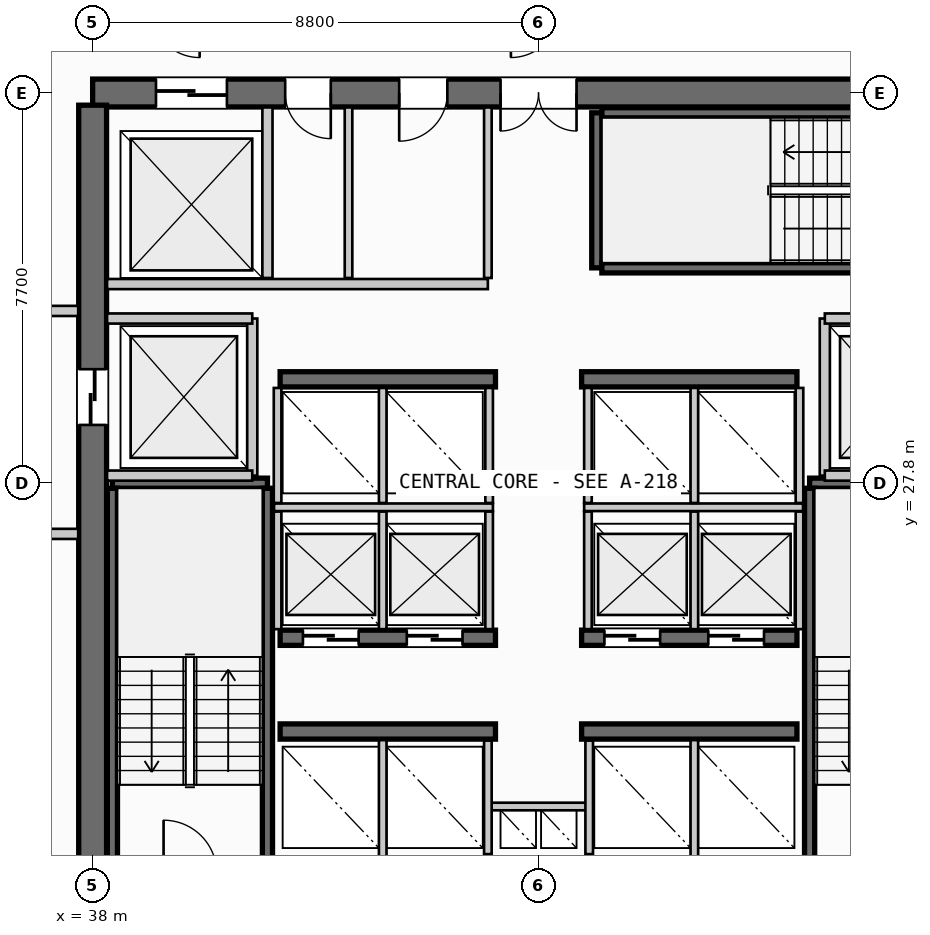
"""IFC4 building model, lengths in metres.
Left out: names, types, materials, properties, quantities, classifications, styles, units other than length and angle.
Written with IfcOpenShell. Run it as: python <this file> out.ifc"""

import sys

from ifc_helpers import new_model, si_unit, direction, frame, frame_2d, origin, place, context, subcontext, project, spatial, rectangle, extrude, source, transform, mapped, element, fill, save


model = new_model("IFC4")
c1 = context("Model", 3, precision=1e-05, world=origin(), true_north=direction((0.0, 1.0)))
c2 = subcontext(c1, "Body", "Model", "MODEL_VIEW")
j1 = project(units=[si_unit("LENGTHUNIT", "METRE"), si_unit("PLANEANGLEUNIT", "RADIAN")], contexts=[c1])
p1 = place(None, origin())
s1 = spatial("IfcSite", under=j1, at=p1, CompositionType="ELEMENT")
p2 = place(p1, origin())
s2 = spatial("IfcBuilding", under=s1, at=p2, CompositionType="ELEMENT")
p3 = place(p2, frame((0.0, 0.0, 128.8)))
s3 = spatial("IfcBuildingStorey", under=s2, at=p3, CompositionType="ELEMENT", Elevation=128.8)
p4 = place(p3, frame((55.6, 35.5, 0.0), z_axis=(0.0, 0.0, 1.0), x_axis=(-1.0, 0.0, 0.0)))
e1 = element("IfcWall", 1, at=p4, inside=s3, PredefinedType="SHEAR", context=c2, shape_type="SweptSolid", body=[
    extrude(rectangle(XDim=17.6, YDim=0.55, at=frame_2d((8.8, 0.0))), origin(), (0.0, 0.0, 1.0), 3.3),
])
p5 = place(p4, frame((8.05, 0.0, 0.0)))
e2 = element("IfcOpeningElement", 2, at=p5, cuts=e1, PredefinedType="OPENING", context=c2, shape_type="SweptSolid", body=[
    extrude(rectangle(XDim=1.5, YDim=2.2, at=frame_2d((0.75, 1.1))), frame((0.0, 0.285, 0.0), z_axis=(0.0, -1.0, 0.0), x_axis=(1.0, 0.0, 0.0)), (0.0, 0.0, 1.0), 0.57),
])
p6 = place(p4, frame((14.95, 0.0, 0.0)))
e3 = element("IfcOpeningElement", 3, at=p6, cuts=e1, PredefinedType="OPENING", context=c2, shape_type="SweptSolid", body=[
    extrude(rectangle(XDim=1.4, YDim=2.3, at=frame_2d((0.7, 1.15))), frame((0.0, 0.285, 0.0), z_axis=(0.0, -1.0, 0.0), x_axis=(1.0, 0.0, 0.0)), (0.0, 0.0, 1.0), 0.57),
])
p7 = place(p4, frame((12.9, 0.0, 0.0)))
e4 = element("IfcOpeningElement", 4, at=p7, cuts=e1, PredefinedType="OPENING", context=c2, shape_type="SweptSolid", body=[
    extrude(rectangle(XDim=0.9, YDim=2.15, at=frame_2d((0.45, 1.075))), frame((0.0, 0.285, 0.0), z_axis=(0.0, -1.0, 0.0), x_axis=(1.0, 0.0, 0.0)), (0.0, 0.0, 1.0), 0.57),
])
p8 = place(p4, frame((10.6, 0.0, 0.0)))
e5 = element("IfcOpeningElement", 5, at=p8, cuts=e1, PredefinedType="OPENING", context=c2, shape_type="SweptSolid", body=[
    extrude(rectangle(XDim=0.95, YDim=2.15, at=frame_2d((0.475, 1.075))), frame((0.0, 0.285, 0.0), z_axis=(0.0, -1.0, 0.0), x_axis=(1.0, 0.0, 0.0)), (0.0, 0.0, 1.0), 0.57),
])
p9 = place(p3, frame((38.0, 35.26, 0.0), z_axis=(0.0, 0.0, 1.0), x_axis=(0.0, -1.0, 0.0)))
e6 = element("IfcWall", 6, at=p9, inside=s3, PredefinedType="SHEAR", context=c2, shape_type="SweptSolid", body=[
    extrude(rectangle(XDim=14.92, YDim=0.55, at=frame_2d((7.46, 0.0))), origin(), (0.0, 0.0, 1.0), 3.3),
])
p10 = place(p9, frame((5.21, 0.0, 0.0)))
e7 = element("IfcOpeningElement", 7, at=p10, cuts=e6, PredefinedType="OPENING", context=c2, shape_type="SweptSolid", body=[
    extrude(rectangle(XDim=1.1, YDim=2.2, at=frame_2d((0.55, 1.1))), frame((0.0, 0.285, 0.0), z_axis=(0.0, -1.0, 0.0), x_axis=(1.0, 0.0, 0.0)), (0.0, 0.0, 1.0), 0.57),
])
for number, where, z_axis, x_axis in (
    (8, (41.7, 22.9, 0.0), (0.0, 0.0, 1.0), (1.0, 0.0, 0.0)),
    (9, (47.65, 22.9, 0.0), (0.0, 0.0, 1.0), (1.0, 0.0, 0.0)),
):
    element("IfcWall", number, at=place(p3, frame(where, z_axis=z_axis, x_axis=x_axis)), inside=s3, PredefinedType="SHEAR", context=c2, shape_type="SweptSolid", body=[
        extrude(rectangle(XDim=4.25, YDim=0.3, at=frame_2d((2.125, 0.0))), origin(), (0.0, 0.0, 1.0), 3.3),
    ])
p11 = place(p3, frame((41.7, 24.75, 0.0), z_axis=(0.0, 0.0, 1.0), x_axis=(1.0, 0.0, 0.0)))
e10 = element("IfcWall", 10, at=p11, inside=s3, PredefinedType="SHEAR", context=c2, shape_type="SweptSolid", body=[
    extrude(rectangle(XDim=4.25, YDim=0.3, at=frame_2d((2.125, 0.0))), origin(), (0.0, 0.0, 1.0), 3.3),
])
p12 = place(p11, frame((0.45, 0.0, 0.0)))
e11 = element("IfcOpeningElement", 11, at=p12, cuts=e10, PredefinedType="OPENING", context=c2, shape_type="SweptSolid", body=[
    extrude(rectangle(XDim=1.1, YDim=2.2, at=frame_2d((0.55, 1.1))), frame((0.0, 0.16, 0.0), z_axis=(0.0, -1.0, 0.0), x_axis=(1.0, 0.0, 0.0)), (0.0, 0.0, 1.0), 0.32),
])
p13 = place(p11, frame((2.5, 0.0, 0.0)))
e12 = element("IfcOpeningElement", 12, at=p13, cuts=e10, PredefinedType="OPENING", context=c2, shape_type="SweptSolid", body=[
    extrude(rectangle(XDim=1.1, YDim=2.2, at=frame_2d((0.55, 1.1))), frame((0.0, 0.16, 0.0), z_axis=(0.0, -1.0, 0.0), x_axis=(1.0, 0.0, 0.0)), (0.0, 0.0, 1.0), 0.32),
])
p14 = place(p3, frame((47.65, 24.75, 0.0), z_axis=(0.0, 0.0, 1.0), x_axis=(1.0, 0.0, 0.0)))
e13 = element("IfcWall", 13, at=p14, inside=s3, PredefinedType="SHEAR", context=c2, shape_type="SweptSolid", body=[
    extrude(rectangle(XDim=4.25, YDim=0.3, at=frame_2d((2.125, 0.0))), origin(), (0.0, 0.0, 1.0), 3.3),
])
p15 = place(p14, frame((0.45, 0.0, 0.0)))
e14 = element("IfcOpeningElement", 14, at=p15, cuts=e13, PredefinedType="OPENING", context=c2, shape_type="SweptSolid", body=[
    extrude(rectangle(XDim=1.1, YDim=2.2, at=frame_2d((0.55, 1.1))), frame((0.0, 0.16, 0.0), z_axis=(0.0, -1.0, 0.0), x_axis=(1.0, 0.0, 0.0)), (0.0, 0.0, 1.0), 0.32),
])
p16 = place(p14, frame((2.5, 0.0, 0.0)))
e15 = element("IfcOpeningElement", 15, at=p16, cuts=e13, PredefinedType="OPENING", context=c2, shape_type="SweptSolid", body=[
    extrude(rectangle(XDim=1.1, YDim=2.2, at=frame_2d((0.55, 1.1))), frame((0.0, 0.16, 0.0), z_axis=(0.0, -1.0, 0.0), x_axis=(1.0, 0.0, 0.0)), (0.0, 0.0, 1.0), 0.32),
])
for number, where, z_axis, x_axis in (
    (16, (41.7, 29.85, 0.0), (0.0, 0.0, 1.0), (1.0, 0.0, 0.0)),
    (17, (47.65, 29.85, 0.0), (0.0, 0.0, 1.0), (1.0, 0.0, 0.0)),
):
    element("IfcWall", number, at=place(p3, frame(where, z_axis=z_axis, x_axis=x_axis)), inside=s3, PredefinedType="SHEAR", context=c2, shape_type="SweptSolid", body=[
        extrude(rectangle(XDim=4.25, YDim=0.3, at=frame_2d((2.125, 0.0))), origin(), (0.0, 0.0, 1.0), 3.3),
    ])
p17 = place(p3, frame((38.39, 27.8, 0.0), z_axis=(0.0, 0.0, 1.0), x_axis=(1.0, 0.0, 0.0)))
e18 = element("IfcWall", 18, at=p17, inside=s3, PredefinedType="SHEAR", context=c2, shape_type="SweptSolid", body=[
    extrude(rectangle(XDim=3.06, YDim=0.2, at=frame_2d((1.53, 0.0))), origin(), (0.0, 0.0, 1.0), 3.3),
])
for number, where, z_axis, x_axis in (
    (19, (41.45, 27.7, 0.0), (0.0, 0.0, 1.0), (0.0, -1.0, 0.0)),
    (20, (38.39, 20.35, 0.0), (0.0, 0.0, 1.0), (0.0, 1.0, 0.0)),
):
    element("IfcWall", number, at=place(p3, frame(where, z_axis=z_axis, x_axis=x_axis)), inside=s3, PredefinedType="SHEAR", context=c2, shape_type="SweptSolid", body=[
        extrude(rectangle(XDim=7.35, YDim=0.2, at=frame_2d((3.675, 0.0))), origin(), (0.0, 0.0, 1.0), 3.3),
    ])
p18 = place(p3, frame((52.15, 27.8, 0.0), z_axis=(0.0, 0.0, 1.0), x_axis=(1.0, 0.0, 0.0)))
e21 = element("IfcWall", 21, at=p18, inside=s3, PredefinedType="SHEAR", context=c2, shape_type="SweptSolid", body=[
    extrude(rectangle(XDim=3.06, YDim=0.2, at=frame_2d((1.53, 0.0))), origin(), (0.0, 0.0, 1.0), 3.3),
])
p19 = place(p3, frame((52.15, 20.35, 0.0), z_axis=(0.0, 0.0, 1.0), x_axis=(0.0, 1.0, 0.0)))
e22 = element("IfcWall", 22, at=p19, inside=s3, PredefinedType="SHEAR", context=c2, shape_type="SweptSolid", body=[
    extrude(rectangle(XDim=7.35, YDim=0.2, at=frame_2d((3.675, 0.0))), origin(), (0.0, 0.0, 1.0), 3.3),
])
p20 = place(p3, frame((47.95, 32.05, 0.0), z_axis=(0.0, 0.0, 1.0), x_axis=(0.0, 1.0, 0.0)))
e23 = element("IfcWall", 23, at=p20, inside=s3, PredefinedType="SHEAR", context=c2, shape_type="SweptSolid", body=[
    extrude(rectangle(XDim=3.06, YDim=0.2, at=frame_2d((1.53, 0.0))), origin(), (0.0, 0.0, 1.0), 3.3),
])
for number, where, z_axis, x_axis in (
    (24, (48.05, 35.11, 0.0), (0.0, 0.0, 1.0), (1.0, 0.0, 0.0)),
    (25, (55.4, 32.05, 0.0), (0.0, 0.0, 1.0), (-1.0, 0.0, 0.0)),
):
    element("IfcWall", number, at=place(p3, frame(where, z_axis=z_axis, x_axis=x_axis)), inside=s3, PredefinedType="SHEAR", context=c2, shape_type="SweptSolid", body=[
        extrude(rectangle(XDim=7.35, YDim=0.2, at=frame_2d((3.675, 0.0))), origin(), (0.0, 0.0, 1.0), 3.3),
    ])
p21 = place(p3, frame((45.8, 21.42, 0.0), z_axis=(0.0, 0.0, 1.0), x_axis=(1.0, 0.0, 0.0)))
e26 = element("IfcWall", 26, at=p21, inside=s3, PredefinedType="PARTITIONING", context=c2, shape_type="SweptSolid", body=[
    extrude(rectangle(XDim=2.0, YDim=0.15, at=frame_2d((1.0, 0.0))), origin(), (0.0, 0.0, 1.0), 2.445),
])
for number, where, z_axis, x_axis in (
    (27, (45.8, 20.48, 0.0), (0.0, 0.0, 1.0), (0.0, 1.0, 0.0)),
    (28, (47.8, 20.48, 0.0), (0.0, 0.0, 1.0), (0.0, 1.0, 0.0)),
):
    element("IfcWall", number, at=place(p3, frame(where, z_axis=z_axis, x_axis=x_axis)), inside=s3, PredefinedType="PARTITIONING", context=c2, shape_type="SweptSolid", body=[
        extrude(rectangle(XDim=2.24, YDim=0.15, at=frame_2d((1.12, 0.0))), origin(), (0.0, 0.0, 1.0), 2.445),
    ])
p22 = place(p3, frame((41.15, 27.95, 0.0), z_axis=(0.0, 0.0, 1.0), x_axis=(0.0, 1.0, 0.0)))
e29 = element("IfcWall", 29, at=p22, inside=s3, PredefinedType="PARTITIONING", context=c2, shape_type="SweptSolid", body=[
    extrude(rectangle(XDim=3.1, YDim=0.2, at=frame_2d((1.55, 0.0))), origin(), (0.0, 0.0, 1.0), 2.445),
])
for number, where, z_axis, x_axis in (
    (30, (38.285, 27.95, 0.0), (0.0, 0.0, 1.0), (1.0, 0.0, 0.0)),
    (31, (38.285, 31.05, 0.0), (0.0, 0.0, 1.0), (1.0, 0.0, 0.0)),
):
    element("IfcWall", number, at=place(p3, frame(where, z_axis=z_axis, x_axis=x_axis)), inside=s3, PredefinedType="PARTITIONING", context=c2, shape_type="SweptSolid", body=[
        extrude(rectangle(XDim=2.865, YDim=0.2, at=frame_2d((1.433, 0.0))), origin(), (0.0, 0.0, 1.0), 2.445),
    ])
for number, where, z_axis, x_axis in (
    (32, (34.5, 26.8, 0.0), (0.0, 0.0, 1.0), (1.0, 0.0, 0.0)),
    (33, (34.5, 31.2, 0.0), (0.0, 0.0, 1.0), (1.0, 0.0, 0.0)),
):
    element("IfcWall", number, at=place(p3, frame(where, z_axis=z_axis, x_axis=x_axis)), inside=s3, PredefinedType="PARTITIONING", context=c2, shape_type="SweptSolid", body=[
        extrude(rectangle(XDim=3.215, YDim=0.2, at=frame_2d((1.607, 0.0))), origin(), (0.0, 0.0, 1.0), 2.445),
    ])
p23 = place(p3, frame((52.45, 27.95, 0.0), z_axis=(0.0, 0.0, 1.0), x_axis=(0.0, 1.0, 0.0)))
e34 = element("IfcWall", 34, at=p23, inside=s3, PredefinedType="PARTITIONING", context=c2, shape_type="SweptSolid", body=[
    extrude(rectangle(XDim=3.1, YDim=0.2, at=frame_2d((1.55, 0.0))), origin(), (0.0, 0.0, 1.0), 2.445),
])
for number, where, z_axis, x_axis in (
    (35, (52.45, 27.95, 0.0), (0.0, 0.0, 1.0), (1.0, 0.0, 0.0)),
    (36, (52.45, 31.05, 0.0), (0.0, 0.0, 1.0), (1.0, 0.0, 0.0)),
):
    element("IfcWall", number, at=place(p3, frame(where, z_axis=z_axis, x_axis=x_axis)), inside=s3, PredefinedType="PARTITIONING", context=c2, shape_type="SweptSolid", body=[
        extrude(rectangle(XDim=2.865, YDim=0.2, at=frame_2d((1.433, 0.0))), origin(), (0.0, 0.0, 1.0), 2.445),
    ])
for number, where, z_axis, x_axis in (
    (37, (43.725, 20.385, 0.0), (0.0, 0.0, 1.0), (0.0, 1.0, 0.0)),
    (38, (49.875, 20.385, 0.0), (0.0, 0.0, 1.0), (0.0, 1.0, 0.0)),
):
    element("IfcWall", number, at=place(p3, frame(where, z_axis=z_axis, x_axis=x_axis)), inside=s3, PredefinedType="PARTITIONING", context=c2, shape_type="SweptSolid", body=[
        extrude(rectangle(XDim=2.345, YDim=0.15, at=frame_2d((1.172, 0.0))), origin(), (0.0, 0.0, 1.0), 2.445),
    ])
p24 = place(p3, frame((41.58, 27.325, 0.0), z_axis=(0.0, 0.0, 1.0), x_axis=(1.0, 0.0, 0.0)))
e39 = element("IfcWall", 39, at=p24, inside=s3, PredefinedType="PARTITIONING", context=c2, shape_type="SweptSolid", body=[
    extrude(rectangle(XDim=4.32, YDim=0.15, at=frame_2d((2.16, 0.0))), origin(), (0.0, 0.0, 1.0), 2.445),
])
p25 = place(p3, frame((47.7, 27.325, 0.0), z_axis=(0.0, 0.0, 1.0), x_axis=(1.0, 0.0, 0.0)))
e40 = element("IfcWall", 40, at=p25, inside=s3, PredefinedType="PARTITIONING", context=c2, shape_type="SweptSolid", body=[
    extrude(rectangle(XDim=4.32, YDim=0.15, at=frame_2d((2.16, 0.0))), origin(), (0.0, 0.0, 1.0), 2.445),
])
for number, where, z_axis, x_axis in (
    (41, (41.65, 24.92, 0.0), (0.0, 0.0, 1.0), (0.0, 1.0, 0.0)),
    (42, (43.725, 24.92, 0.0), (0.0, 0.0, 1.0), (0.0, 1.0, 0.0)),
    (43, (45.825, 24.92, 0.0), (0.0, 0.0, 1.0), (0.0, 1.0, 0.0)),
    (44, (47.775, 24.92, 0.0), (0.0, 0.0, 1.0), (0.0, 1.0, 0.0)),
    (45, (49.875, 24.92, 0.0), (0.0, 0.0, 1.0), (0.0, 1.0, 0.0)),
    (46, (51.95, 24.92, 0.0), (0.0, 0.0, 1.0), (0.0, 1.0, 0.0)),
):
    element("IfcWall", number, at=place(p3, frame(where, z_axis=z_axis, x_axis=x_axis)), inside=s3, PredefinedType="PARTITIONING", context=c2, shape_type="SweptSolid", body=[
        extrude(rectangle(XDim=2.32, YDim=0.15, at=frame_2d((1.16, 0.0))), origin(), (0.0, 0.0, 1.0), 2.445),
    ])
for number, where, z_axis, x_axis in (
    (47, (41.65, 27.41, 0.0), (0.0, 0.0, 1.0), (0.0, 1.0, 0.0)),
    (48, (43.725, 27.41, 0.0), (0.0, 0.0, 1.0), (0.0, 1.0, 0.0)),
    (49, (45.825, 27.41, 0.0), (0.0, 0.0, 1.0), (0.0, 1.0, 0.0)),
    (50, (47.775, 27.41, 0.0), (0.0, 0.0, 1.0), (0.0, 1.0, 0.0)),
    (51, (49.875, 27.41, 0.0), (0.0, 0.0, 1.0), (0.0, 1.0, 0.0)),
    (52, (51.95, 27.41, 0.0), (0.0, 0.0, 1.0), (0.0, 1.0, 0.0)),
):
    element("IfcWall", number, at=place(p3, frame(where, z_axis=z_axis, x_axis=x_axis)), inside=s3, PredefinedType="PARTITIONING", context=c2, shape_type="SweptSolid", body=[
        extrude(rectangle(XDim=2.27, YDim=0.15, at=frame_2d((1.135, 0.0))), origin(), (0.0, 0.0, 1.0), 2.445),
    ])
p26 = place(p3, frame((41.45, 31.85, 0.0), z_axis=(0.0, 0.0, 1.0), x_axis=(0.0, 1.0, 0.0)))
e53 = element("IfcWall", 53, at=p26, inside=s3, PredefinedType="PARTITIONING", context=c2, shape_type="SweptSolid", body=[
    extrude(rectangle(XDim=3.365, YDim=0.2, at=frame_2d((1.683, 0.0))), origin(), (0.0, 0.0, 1.0), 2.445),
])
p27 = place(p3, frame((38.285, 31.73, 0.0), z_axis=(0.0, 0.0, 1.0), x_axis=(1.0, 0.0, 0.0)))
e54 = element("IfcWall", 54, at=p27, inside=s3, PredefinedType="PARTITIONING", context=c2, shape_type="SweptSolid", body=[
    extrude(rectangle(XDim=7.515, YDim=0.2, at=frame_2d((3.758, 0.0))), origin(), (0.0, 0.0, 1.0), 2.445),
])
p28 = place(p3, frame((45.8, 31.85, 0.0), z_axis=(0.0, 0.0, 1.0), x_axis=(0.0, 1.0, 0.0)))
e55 = element("IfcWall", 55, at=p28, inside=s3, PredefinedType="PARTITIONING", context=c2, shape_type="SweptSolid", body=[
    extrude(rectangle(XDim=3.365, YDim=0.15, at=frame_2d((1.683, 0.0))), origin(), (0.0, 0.0, 1.0), 2.445),
])
p29 = place(p3, frame((43.05, 31.85, 0.0), z_axis=(0.0, 0.0, 1.0), x_axis=(0.0, 1.0, 0.0)))
e56 = element("IfcWall", 56, at=p29, inside=s3, PredefinedType="PLUMBINGWALL", context=c2, shape_type="SweptSolid", body=[
    extrude(rectangle(XDim=3.365, YDim=0.15, at=frame_2d((1.683, 0.0))), origin(), (0.0, 0.0, 1.0), 2.445),
])
m1 = source(origin(), c2, "Body", "SweptSolid", [
    extrude(rectangle(XDim=1.5, YDim=2.2, at=frame_2d((0.75, 1.1))), frame((0.0, 0.025, 0.0), z_axis=(0.0, -1.0, 0.0), x_axis=(1.0, 0.0, 0.0)), (0.0, 0.0, 1.0), 0.05),
])
p30 = place(p5, origin())
e57 = element("IfcDoor", 57, at=p30, inside=s3, OperationType="DOUBLE_DOOR_SINGLE_SWING", PredefinedType="DOOR", context=c2, shape_type="MappedRepresentation", body=[
    mapped(m1, transform((0.0, 0.0, 0.0), scale=1.0)),
])
fill(e2, e57)
m2 = source(origin(), c2, "Body", "SweptSolid", [
    extrude(rectangle(XDim=1.1, YDim=2.2, at=frame_2d((0.55, 1.1))), frame((0.0, 0.025, 0.0), z_axis=(0.0, -1.0, 0.0), x_axis=(1.0, 0.0, 0.0)), (0.0, 0.0, 1.0), 0.05),
])
p31 = place(p10, origin())
e58 = element("IfcDoor", 58, at=p31, inside=s3, OperationType="SLIDING_TO_LEFT", PredefinedType="DOOR", context=c2, shape_type="MappedRepresentation", body=[
    mapped(m2, transform((0.0, 0.0, 0.0), scale=1.0)),
])
fill(e7, e58)
p32 = place(p12, origin())
e59 = element("IfcDoor", 59, at=p32, inside=s3, OperationType="SLIDING_TO_RIGHT", PredefinedType="DOOR", context=c2, shape_type="MappedRepresentation", body=[
    mapped(m2, transform((0.0, 0.0, 0.0), scale=1.0)),
])
fill(e11, e59)
p33 = place(p13, origin())
e60 = element("IfcDoor", 60, at=p33, inside=s3, OperationType="SLIDING_TO_RIGHT", PredefinedType="DOOR", context=c2, shape_type="MappedRepresentation", body=[
    mapped(m2, transform((0.0, 0.0, 0.0), scale=1.0)),
])
fill(e12, e60)
p34 = place(p15, origin())
e61 = element("IfcDoor", 61, at=p34, inside=s3, OperationType="SLIDING_TO_RIGHT", PredefinedType="DOOR", context=c2, shape_type="MappedRepresentation", body=[
    mapped(m2, transform((0.0, 0.0, 0.0), scale=1.0)),
])
fill(e14, e61)
p35 = place(p16, origin())
e62 = element("IfcDoor", 62, at=p35, inside=s3, OperationType="SLIDING_TO_RIGHT", PredefinedType="DOOR", context=c2, shape_type="MappedRepresentation", body=[
    mapped(m2, transform((0.0, 0.0, 0.0), scale=1.0)),
])
fill(e15, e62)
m3 = source(origin(), c2, "Body", "SweptSolid", [
    extrude(rectangle(XDim=1.4, YDim=2.3, at=frame_2d((0.7, 1.15))), frame((0.0, 0.025, 0.0), z_axis=(0.0, -1.0, 0.0), x_axis=(1.0, 0.0, 0.0)), (0.0, 0.0, 1.0), 0.05),
])
p36 = place(p6, origin())
e63 = element("IfcDoor", 63, at=p36, inside=s3, OperationType="SLIDING_TO_RIGHT", PredefinedType="DOOR", context=c2, shape_type="MappedRepresentation", body=[
    mapped(m3, transform((0.0, 0.0, 0.0), scale=1.0)),
])
fill(e3, e63)
m4 = source(origin(), c2, "Body", "SweptSolid", [
    extrude(rectangle(XDim=0.9, YDim=2.15, at=frame_2d((0.45, 1.075))), frame((0.0, 0.025, 0.0), z_axis=(0.0, -1.0, 0.0), x_axis=(1.0, 0.0, 0.0)), (0.0, 0.0, 1.0), 0.05),
])
p37 = place(p7, origin())
e64 = element("IfcDoor", 64, at=p37, inside=s3, OperationType="SINGLE_SWING_LEFT", PredefinedType="DOOR", context=c2, shape_type="MappedRepresentation", body=[
    mapped(m4, transform((0.0, 0.0, 0.0), scale=1.0)),
])
fill(e4, e64)
m5 = source(origin(), c2, "Body", "SweptSolid", [
    extrude(rectangle(XDim=0.95, YDim=2.15, at=frame_2d((0.475, 1.075))), frame((0.0, 0.025, 0.0), z_axis=(0.0, -1.0, 0.0), x_axis=(1.0, 0.0, 0.0)), (0.0, 0.0, 1.0), 0.05),
])
p38 = place(p8, origin())
e65 = element("IfcDoor", 65, at=p38, inside=s3, OperationType="SINGLE_SWING_RIGHT", PredefinedType="DOOR", context=c2, shape_type="MappedRepresentation", body=[
    mapped(m5, transform((0.0, 0.0, 0.0), scale=1.0)),
])
fill(e5, e65)
save(model, sys.argv[1])
